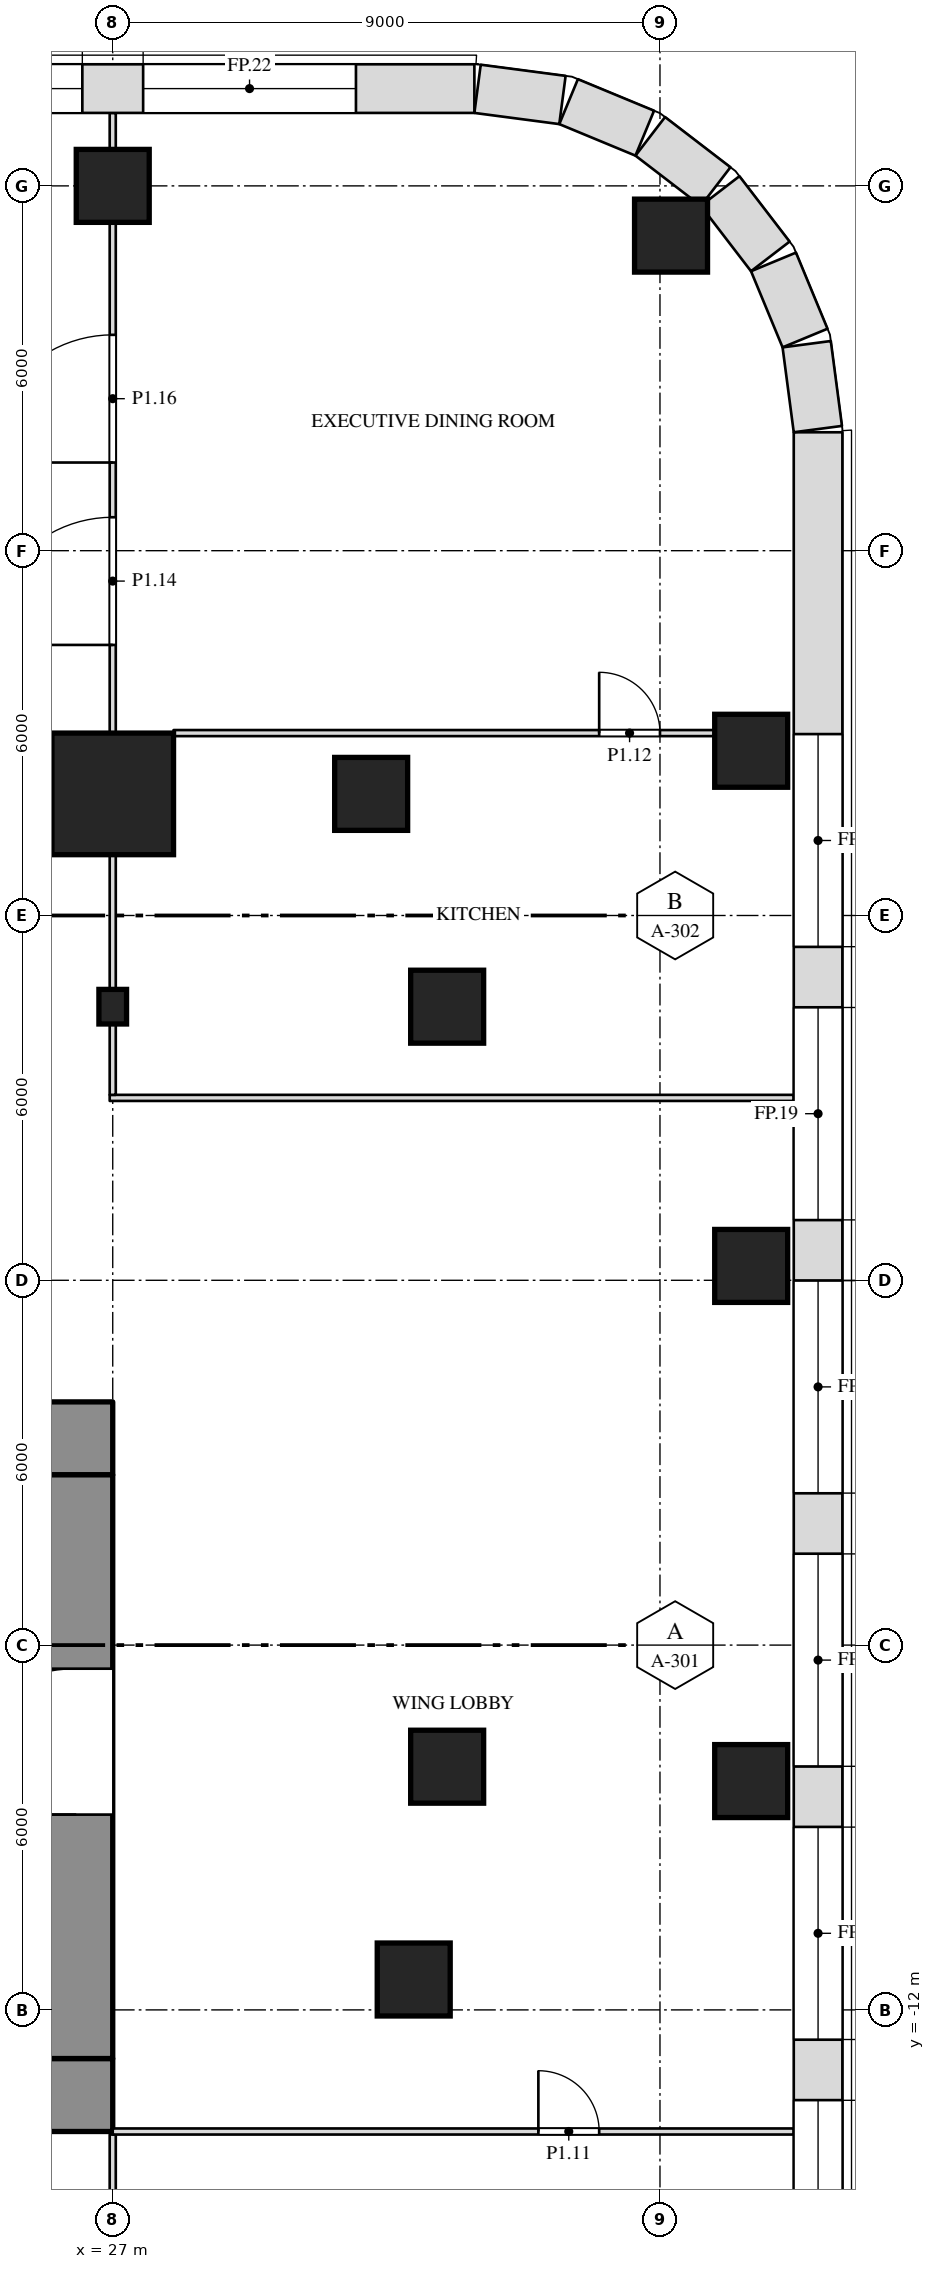
"""IFC4 building model, lengths in metres.
Left out: names, types, materials, properties, quantities, classifications, styles, units other than length and angle.
Written with IfcOpenShell. Run it as: python <this file> out.ifc"""

import sys

from ifc_helpers import new_model, si_unit, direction, frame, frame_2d, origin, origin_2d, place, context, subcontext, project, spatial, rectangle, i_section, extrude, element, fill, save


model = new_model("IFC4")
c1 = context("Model", 3, precision=1e-05, world=origin(), true_north=direction((0.0, 1.0)))
c2 = subcontext(c1, "Body", "Model", "MODEL_VIEW")
j1 = project(units=[si_unit("LENGTHUNIT", "METRE"), si_unit("PLANEANGLEUNIT", "RADIAN")], contexts=[c1])
p1 = place(None, origin())
s1 = spatial("IfcSite", under=j1, at=p1, CompositionType="ELEMENT")
p2 = place(p1, origin())
s2 = spatial("IfcBuilding", under=s1, at=p2, CompositionType="ELEMENT")
p3 = place(p2, frame((0.0, 0.0, 9.0)))
s3 = spatial("IfcBuildingStorey", under=s2, at=p3, CompositionType="ELEMENT", Elevation=9.0)
for number, where, z_axis, x_axis in (
    (1, (31.95, -11.5, 0.0), (0.0, 0.0, 1.0), (1.0, 0.0, 0.0)),
    (2, (37.5, -8.236, 0.0), (0.0, 0.0, 1.0), (1.0, 0.0, 0.0)),
    (3, (32.5, -8.0, 0.0), (0.0, 0.0, 1.0), (1.0, 0.0, 0.0)),
    (4, (37.5, 0.236, 0.0), (0.0, 0.0, 1.0), (1.0, 0.0, 0.0)),
):
    element("IfcColumn", number, at=place(p3, frame(where, z_axis=z_axis, x_axis=x_axis)), inside=s3, PredefinedType="COLUMN", context=c2, shape_type="SweptSolid", body=[
        extrude(rectangle(XDim=1.2, YDim=1.2, at=origin_2d()), origin(), (0.0, 0.0, 1.0), 6.0),
    ])
p4 = place(p3, frame((27.0, 4.5, 0.0), z_axis=(0.0, 0.0, 1.0), x_axis=(1.0, 0.0, 0.0)))
e5 = element("IfcColumn", 5, at=p4, inside=s3, PredefinedType="COLUMN", context=c2, shape_type="SweptSolid", body=[
    extrude(i_section(OverallWidth=0.455, OverallDepth=0.569, WebThickness=0.078, FlangeThickness=0.125, at=origin_2d()), origin(), (0.0, 0.0, 1.0), 6.0),
])
p5 = place(p3, frame((32.5, 4.5, 0.0), z_axis=(0.0, 0.0, 1.0), x_axis=(1.0, 0.0, 0.0)))
e6 = element("IfcColumn", 6, at=p5, inside=s3, PredefinedType="COLUMN", context=c2, shape_type="SweptSolid", body=[
    extrude(rectangle(XDim=1.2, YDim=1.2, at=origin_2d()), origin(), (0.0, 0.0, 1.0), 6.0),
])
p6 = place(p3, frame((27.0, 8.0, 0.0), z_axis=(0.0, 0.0, 1.0), x_axis=(1.0, 0.0, 0.0)))
e7 = element("IfcColumn", 7, at=p6, inside=s3, PredefinedType="COLUMN", context=c2, shape_type="SweptSolid", body=[
    extrude(rectangle(XDim=2.0, YDim=2.0, at=origin_2d()), origin(), (0.0, 0.0, 1.0), 6.0),
])
for number, where, z_axis, x_axis in (
    (8, (31.25, 8.0, 0.0), (0.0, 0.0, 1.0), (1.0, 0.0, 0.0)),
    (9, (37.5, 8.709, 0.0), (0.0, 0.0, 1.0), (1.0, 0.0, 0.0)),
    (10, (36.182, 17.182, 0.0), (0.0, 0.0, 1.0), (1.0, 0.0, 0.0)),
    (11, (27.0, 18.0, 0.0), (0.0, 0.0, 1.0), (1.0, 0.0, 0.0)),
):
    element("IfcColumn", number, at=place(p3, frame(where, z_axis=z_axis, x_axis=x_axis)), inside=s3, PredefinedType="COLUMN", context=c2, shape_type="SweptSolid", body=[
        extrude(rectangle(XDim=1.2, YDim=1.2, at=origin_2d()), origin(), (0.0, 0.0, 1.0), 6.0),
    ])
p7 = place(p3, frame((-27.0, -2.6, 0.0), z_axis=(0.0, 0.0, 1.0), x_axis=(1.0, 0.0, 0.0)))
e12 = element("IfcWall", 12, at=p7, inside=s3, PredefinedType="SHEAR", context=c2, shape_type="SweptSolid", body=[
    extrude(rectangle(XDim=54.0, YDim=1.2, at=frame_2d((27.0, 0.0))), origin(), (0.0, 0.0, 1.0), 5.7),
])
p8 = place(p3, frame((-27.0, -13.4, 0.0), z_axis=(0.0, 0.0, 1.0), x_axis=(1.0, 0.0, 0.0)))
e13 = element("IfcWall", 13, at=p8, inside=s3, PredefinedType="SHEAR", context=c2, shape_type="SweptSolid", body=[
    extrude(rectangle(XDim=54.0, YDim=1.2, at=frame_2d((27.0, 0.0))), origin(), (0.0, 0.0, 1.0), 5.7),
])
p9 = place(p8, frame((16.45, 0.0, 0.0)))
e14 = element("IfcOpeningElement", 14, at=p9, cuts=e13, PredefinedType="OPENING", context=c2, shape_type="SweptSolid", body=[
    extrude(rectangle(XDim=1.0, YDim=2.1, at=frame_2d((0.5, 1.05))), frame((0.0, 0.612, 0.0), z_axis=(0.0, -1.0, 0.0), x_axis=(1.0, 0.0, 0.0)), (0.0, 0.0, 1.0), 1.224),
])
p10 = place(p8, frame((36.55, 0.0, 0.0)))
e15 = element("IfcOpeningElement", 15, at=p10, cuts=e13, PredefinedType="OPENING", context=c2, shape_type="SweptSolid", body=[
    extrude(rectangle(XDim=1.0, YDim=2.1, at=frame_2d((0.5, 1.05))), frame((0.0, 0.612, 0.0), z_axis=(0.0, -1.0, 0.0), x_axis=(1.0, 0.0, 0.0)), (0.0, 0.0, 1.0), 1.224),
])
p11 = place(p3, frame((26.4, -12.8, 0.0), z_axis=(0.0, 0.0, 1.0), x_axis=(0.0, 1.0, 0.0)))
e16 = element("IfcWall", 16, at=p11, inside=s3, PredefinedType="SHEAR", context=c2, shape_type="SweptSolid", body=[
    extrude(rectangle(XDim=9.6, YDim=1.2, at=frame_2d((4.8, 0.0))), origin(), (0.0, 0.0, 1.0), 5.7),
])
p12 = place(p11, frame((4.012, 0.0, 0.0)))
e17 = element("IfcOpeningElement", 17, at=p12, cuts=e16, PredefinedType="OPENING", context=c2, shape_type="SweptSolid", body=[
    extrude(rectangle(XDim=2.4, YDim=2.1, at=frame_2d((1.2, 1.05))), frame((0.0, 0.612, 0.0), z_axis=(0.0, -1.0, 0.0), x_axis=(1.0, 0.0, 0.0)), (0.0, 0.0, 1.0), 1.224),
])
p13 = place(p3, frame((27.0, -16.9, 0.0), z_axis=(0.0, 0.0, 1.0), x_axis=(0.0, 1.0, 0.0)))
e18 = element("IfcWall", 18, at=p13, inside=s3, PredefinedType="PARTITIONING", context=c2, shape_type="SweptSolid", body=[
    extrude(rectangle(XDim=2.85, YDim=0.1, at=frame_2d((1.425, 0.0))), origin(), (0.0, 0.0, 1.0), 5.088),
])
p14 = place(p3, frame((27.0, -14.0, 0.0), z_axis=(0.0, 0.0, 1.0), x_axis=(1.0, 0.0, 0.0)))
e19 = element("IfcWall", 19, at=p14, inside=s3, PredefinedType="PARTITIONING", context=c2, shape_type="SweptSolid", body=[
    extrude(rectangle(XDim=11.2, YDim=0.1, at=frame_2d((5.6, 0.0))), origin(), (0.0, 0.0, 1.0), 5.7),
])
p15 = place(p14, frame((7.0, 0.0, 0.0)))
e20 = element("IfcOpeningElement", 20, at=p15, cuts=e19, PredefinedType="OPENING", context=c2, shape_type="SweptSolid", body=[
    extrude(rectangle(XDim=1.0, YDim=2.1, at=frame_2d((0.5, 1.05))), frame((0.0, 0.062, 0.0), z_axis=(0.0, -1.0, 0.0), x_axis=(1.0, 0.0, 0.0)), (0.0, 0.0, 1.0), 0.124),
])
p16 = place(p3, frame((26.95, 3.0, 0.0), z_axis=(0.0, 0.0, 1.0), x_axis=(1.0, 0.0, 0.0)))
e21 = element("IfcWall", 21, at=p16, inside=s3, PredefinedType="PARTITIONING", context=c2, shape_type="SweptSolid", body=[
    extrude(rectangle(XDim=11.25, YDim=0.1, at=frame_2d((5.625, 0.0))), origin(), (0.0, 0.0, 1.0), 5.7),
])
p17 = place(p3, frame((27.0, 3.05, 0.0), z_axis=(0.0, 0.0, 1.0), x_axis=(0.0, 1.0, 0.0)))
e22 = element("IfcWall", 22, at=p17, inside=s3, PredefinedType="PARTITIONING", context=c2, shape_type="SweptSolid", body=[
    extrude(rectangle(XDim=1.166, YDim=0.1, at=frame_2d((0.583, 0.0))), origin(), (0.0, 0.0, 1.0), 5.088),
])
p18 = place(p3, frame((27.0, 4.784, 0.0), z_axis=(0.0, 0.0, 1.0), x_axis=(0.0, 1.0, 0.0)))
e23 = element("IfcWall", 23, at=p18, inside=s3, PredefinedType="PARTITIONING", context=c2, shape_type="SweptSolid", body=[
    extrude(rectangle(XDim=2.216, YDim=0.1, at=frame_2d((1.108, 0.0))), origin(), (0.0, 0.0, 1.0), 5.088),
])
p19 = place(p3, frame((27.0, 9.0, 0.0), z_axis=(0.0, 0.0, 1.0), x_axis=(0.0, 1.0, 0.0)))
e24 = element("IfcWall", 24, at=p19, inside=s3, PredefinedType="PARTITIONING", context=c2, shape_type="SweptSolid", body=[
    extrude(rectangle(XDim=8.4, YDim=0.1, at=frame_2d((4.2, 0.0))), origin(), (0.0, 0.0, 1.0), 5.088),
])
p20 = place(p19, frame((1.45, 0.0, 0.0)))
e25 = element("IfcOpeningElement", 25, at=p20, cuts=e24, PredefinedType="OPENING", context=c2, shape_type="SweptSolid", body=[
    extrude(rectangle(XDim=2.1, YDim=2.4, at=frame_2d((1.05, 1.2))), frame((0.0, 0.062, 0.0), z_axis=(0.0, -1.0, 0.0), x_axis=(1.0, 0.0, 0.0)), (0.0, 0.0, 1.0), 0.124),
])
p21 = place(p19, frame((4.45, 0.0, 0.0)))
e26 = element("IfcOpeningElement", 26, at=p21, cuts=e24, PredefinedType="OPENING", context=c2, shape_type="SweptSolid", body=[
    extrude(rectangle(XDim=2.1, YDim=2.4, at=frame_2d((1.05, 1.2))), frame((0.0, 0.062, 0.0), z_axis=(0.0, -1.0, 0.0), x_axis=(1.0, 0.0, 0.0)), (0.0, 0.0, 1.0), 0.124),
])
p22 = place(p3, frame((27.0, 18.6, 0.0), z_axis=(0.0, 0.0, 1.0), x_axis=(0.0, 1.0, 0.0)))
e27 = element("IfcWall", 27, at=p22, inside=s3, PredefinedType="PARTITIONING", context=c2, shape_type="SweptSolid", body=[
    extrude(rectangle(XDim=0.6, YDim=0.1, at=frame_2d((0.3, 0.0))), origin(), (0.0, 0.0, 1.0), 5.7),
])
p23 = place(p3, frame((28.0, 9.0, 0.0), z_axis=(0.0, 0.0, 1.0), x_axis=(1.0, 0.0, 0.0)))
e28 = element("IfcWall", 28, at=p23, inside=s3, PredefinedType="PARTITIONING", context=c2, shape_type="SweptSolid", body=[
    extrude(rectangle(XDim=8.9, YDim=0.1, at=frame_2d((4.45, 0.0))), origin(), (0.0, 0.0, 1.0), 5.7),
])
p24 = place(p23, frame((7.0, 0.0, 0.0)))
e29 = element("IfcOpeningElement", 29, at=p24, cuts=e28, PredefinedType="OPENING", context=c2, shape_type="SweptSolid", body=[
    extrude(rectangle(XDim=1.0, YDim=2.1, at=frame_2d((0.5, 1.05))), frame((0.0, 0.062, 0.0), z_axis=(0.0, -1.0, 0.0), x_axis=(1.0, 0.0, 0.0)), (0.0, 0.0, 1.0), 0.124),
])
p25 = place(p3, frame((38.6, -21.948, 0.0), z_axis=(0.0, 0.0, 1.0), x_axis=(0.0, 1.0, 0.0)))
e30 = element("IfcWall", 30, at=p25, inside=s3, PredefinedType="SOLIDWALL", context=c2, shape_type="SweptSolid", body=[
    extrude(rectangle(XDim=35.895, YDim=0.8, at=frame_2d((17.948, 0.0))), origin(), (0.0, 0.0, 1.0), 5.7),
])
p26 = place(p25, frame((4.964, 0.0, 1.0)))
e31 = element("IfcOpeningElement", 31, at=p26, cuts=e30, PredefinedType="OPENING", context=c2, shape_type="SweptSolid", body=[
    extrude(rectangle(XDim=3.5, YDim=4.0, at=frame_2d((1.75, 2.0))), frame((0.0, 0.412, 0.0), z_axis=(0.0, -1.0, 0.0), x_axis=(1.0, 0.0, 0.0)), (0.0, 0.0, 1.0), 0.824),
])
p27 = place(p25, frame((9.458, 0.0, 1.0)))
e32 = element("IfcOpeningElement", 32, at=p27, cuts=e30, PredefinedType="OPENING", context=c2, shape_type="SweptSolid", body=[
    extrude(rectangle(XDim=3.5, YDim=4.0, at=frame_2d((1.75, 2.0))), frame((0.0, 0.412, 0.0), z_axis=(0.0, -1.0, 0.0), x_axis=(1.0, 0.0, 0.0)), (0.0, 0.0, 1.0), 0.824),
])
p28 = place(p25, frame((13.951, 0.0, 1.0)))
e33 = element("IfcOpeningElement", 33, at=p28, cuts=e30, PredefinedType="OPENING", context=c2, shape_type="SweptSolid", body=[
    extrude(rectangle(XDim=3.5, YDim=4.0, at=frame_2d((1.75, 2.0))), frame((0.0, 0.412, 0.0), z_axis=(0.0, -1.0, 0.0), x_axis=(1.0, 0.0, 0.0)), (0.0, 0.0, 1.0), 0.824),
])
p29 = place(p25, frame((18.444, 0.0, 1.0)))
e34 = element("IfcOpeningElement", 34, at=p29, cuts=e30, PredefinedType="OPENING", context=c2, shape_type="SweptSolid", body=[
    extrude(rectangle(XDim=3.5, YDim=4.0, at=frame_2d((1.75, 2.0))), frame((0.0, 0.412, 0.0), z_axis=(0.0, -1.0, 0.0), x_axis=(1.0, 0.0, 0.0)), (0.0, 0.0, 1.0), 0.824),
])
p30 = place(p25, frame((22.938, 0.0, 1.0)))
e35 = element("IfcOpeningElement", 35, at=p30, cuts=e30, PredefinedType="OPENING", context=c2, shape_type="SweptSolid", body=[
    extrude(rectangle(XDim=3.5, YDim=4.0, at=frame_2d((1.75, 2.0))), frame((0.0, 0.412, 0.0), z_axis=(0.0, -1.0, 0.0), x_axis=(1.0, 0.0, 0.0)), (0.0, 0.0, 1.0), 0.824),
])
p31 = place(p25, frame((27.431, 0.0, 1.0)))
e36 = element("IfcOpeningElement", 36, at=p31, cuts=e30, PredefinedType="OPENING", context=c2, shape_type="SweptSolid", body=[
    extrude(rectangle(XDim=3.5, YDim=4.0, at=frame_2d((1.75, 2.0))), frame((0.0, 0.412, 0.0), z_axis=(0.0, -1.0, 0.0), x_axis=(1.0, 0.0, 0.0)), (0.0, 0.0, 1.0), 0.824),
])
p32 = place(p3, frame((38.597, 14.0, 0.0), z_axis=(0.0, 0.0, 1.0), x_axis=(-0.130517283865, 0.99144603414, 0.0)))
e37 = element("IfcWall", 37, at=p32, inside=s3, PredefinedType="SOLIDWALL", context=c2, shape_type="SweptSolid", body=[
    extrude(rectangle(XDim=1.408, YDim=0.8, at=frame_2d((0.704, 0.0))), origin(), (0.0, 0.0, 1.0), 5.7),
])
p33 = place(p3, frame((38.386, 15.497, 0.0), z_axis=(0.0, 0.0, 1.0), x_axis=(-0.38276009378, 0.923847774587, 0.0)))
e38 = element("IfcWall", 38, at=p33, inside=s3, PredefinedType="SOLIDWALL", context=c2, shape_type="SweptSolid", body=[
    extrude(rectangle(XDim=1.355, YDim=0.8, at=frame_2d((0.678, 0.0))), origin(), (0.0, 0.0, 1.0), 5.7),
])
for number, where, z_axis, x_axis in (
    (39, (37.815, 16.84, 0.0), (0.0, 0.0, 1.0), (-0.609, 0.793, 0.0)),
    (40, (36.916, 17.989, 0.0), (0.0, 0.0, 1.0), (-0.793, 0.609, 0.0)),
):
    element("IfcWall", number, at=place(p3, frame(where, z_axis=z_axis, x_axis=x_axis)), inside=s3, PredefinedType="SOLIDWALL", context=c2, shape_type="SweptSolid", body=[
        extrude(rectangle(XDim=1.356, YDim=0.8, at=frame_2d((0.678, 0.0))), origin(), (0.0, 0.0, 1.0), 5.7),
    ])
p34 = place(p3, frame((35.75, 18.867, 0.0), z_axis=(0.0, 0.0, 1.0), x_axis=(-0.923847774587, 0.38276009378, 0.0)))
e41 = element("IfcWall", 41, at=p34, inside=s3, PredefinedType="SOLIDWALL", context=c2, shape_type="SweptSolid", body=[
    extrude(rectangle(XDim=1.355, YDim=0.8, at=frame_2d((0.678, 0.0))), origin(), (0.0, 0.0, 1.0), 5.7),
])
p35 = place(p3, frame((34.396, 19.413, 0.0), z_axis=(0.0, 0.0, 1.0), x_axis=(-0.99144603414, 0.130517283865, 0.0)))
e42 = element("IfcWall", 42, at=p35, inside=s3, PredefinedType="SOLIDWALL", context=c2, shape_type="SweptSolid", body=[
    extrude(rectangle(XDim=1.408, YDim=0.8, at=frame_2d((0.704, 0.0))), origin(), (0.0, 0.0, 1.0), 5.7),
])
p36 = place(p3, frame((32.948, 19.6, 0.0), z_axis=(0.0, 0.0, 1.0), x_axis=(-1.0, 0.0, 0.0)))
e43 = element("IfcWall", 43, at=p36, inside=s3, PredefinedType="SOLIDWALL", context=c2, shape_type="SweptSolid", body=[
    extrude(rectangle(XDim=14.948, YDim=0.8, at=frame_2d((7.474, 0.0))), origin(), (0.0, 0.0, 1.0), 5.7),
])
p37 = place(p36, frame((1.948, 0.0, 1.0)))
e44 = element("IfcOpeningElement", 44, at=p37, cuts=e43, PredefinedType="OPENING", context=c2, shape_type="SweptSolid", body=[
    extrude(rectangle(XDim=3.5, YDim=4.0, at=frame_2d((1.75, 2.0))), frame((0.0, 0.412, 0.0), z_axis=(0.0, -1.0, 0.0), x_axis=(1.0, 0.0, 0.0)), (0.0, 0.0, 1.0), 0.824),
])
p38 = place(p36, frame((6.448, 0.0, 1.0)))
e45 = element("IfcOpeningElement", 45, at=p38, cuts=e43, PredefinedType="OPENING", context=c2, shape_type="SweptSolid", body=[
    extrude(rectangle(XDim=3.5, YDim=4.0, at=frame_2d((1.75, 2.0))), frame((0.0, 0.412, 0.0), z_axis=(0.0, -1.0, 0.0), x_axis=(1.0, 0.0, 0.0)), (0.0, 0.0, 1.0), 0.824),
])
p39 = place(p36, frame((10.948, 0.0, 1.0)))
e46 = element("IfcOpeningElement", 46, at=p39, cuts=e43, PredefinedType="OPENING", context=c2, shape_type="SweptSolid", body=[
    extrude(rectangle(XDim=3.5, YDim=4.0, at=frame_2d((1.75, 2.0))), frame((0.0, 0.412, 0.0), z_axis=(0.0, -1.0, 0.0), x_axis=(1.0, 0.0, 0.0)), (0.0, 0.0, 1.0), 0.824),
])
p40 = place(p15, origin())
e47 = element("IfcDoor", 47, at=p40, inside=s3, OperationType="SINGLE_SWING_LEFT", PredefinedType="DOOR", context=c2, shape_type="SweptSolid", body=[
    extrude(rectangle(XDim=1.0, YDim=2.1, at=frame_2d((0.5, 1.05))), frame((0.0, 0.025, 0.0), z_axis=(0.0, -1.0, 0.0), x_axis=(1.0, 0.0, 0.0)), (0.0, 0.0, 1.0), 0.05),
])
fill(e20, e47)
p41 = place(p24, origin())
e48 = element("IfcDoor", 48, at=p41, inside=s3, OperationType="SINGLE_SWING_LEFT", PredefinedType="DOOR", context=c2, shape_type="SweptSolid", body=[
    extrude(rectangle(XDim=1.0, YDim=2.1, at=frame_2d((0.5, 1.05))), frame((0.0, 0.025, 0.0), z_axis=(0.0, -1.0, 0.0), x_axis=(1.0, 0.0, 0.0)), (0.0, 0.0, 1.0), 0.05),
])
fill(e29, e48)
p42 = place(p20, origin())
e49 = element("IfcDoor", 49, at=p42, inside=s3, OperationType="DOUBLE_DOOR_SINGLE_SWING", PredefinedType="DOOR", context=c2, shape_type="SweptSolid", body=[
    extrude(rectangle(XDim=2.1, YDim=2.4, at=frame_2d((1.05, 1.2))), frame((0.0, 0.025, 0.0), z_axis=(0.0, -1.0, 0.0), x_axis=(1.0, 0.0, 0.0)), (0.0, 0.0, 1.0), 0.05),
])
fill(e25, e49)
p43 = place(p21, origin())
e50 = element("IfcDoor", 50, at=p43, inside=s3, OperationType="DOUBLE_DOOR_SINGLE_SWING", PredefinedType="DOOR", context=c2, shape_type="SweptSolid", body=[
    extrude(rectangle(XDim=2.1, YDim=2.4, at=frame_2d((1.05, 1.2))), frame((0.0, 0.025, 0.0), z_axis=(0.0, -1.0, 0.0), x_axis=(1.0, 0.0, 0.0)), (0.0, 0.0, 1.0), 0.05),
])
fill(e26, e50)
p44 = place(p26, origin())
e51 = element("IfcWindow", 51, at=p44, inside=s3, PartitioningType="SINGLE_PANEL", PredefinedType="WINDOW", context=c2, shape_type="SweptSolid", body=[
    extrude(rectangle(XDim=3.5, YDim=4.0, at=frame_2d((1.75, 2.0))), frame((0.0, 0.03, 0.0), z_axis=(0.0, -1.0, 0.0), x_axis=(1.0, 0.0, 0.0)), (0.0, 0.0, 1.0), 0.06),
])
fill(e31, e51)
p45 = place(p27, origin())
e52 = element("IfcWindow", 52, at=p45, inside=s3, PartitioningType="SINGLE_PANEL", PredefinedType="WINDOW", context=c2, shape_type="SweptSolid", body=[
    extrude(rectangle(XDim=3.5, YDim=4.0, at=frame_2d((1.75, 2.0))), frame((0.0, 0.03, 0.0), z_axis=(0.0, -1.0, 0.0), x_axis=(1.0, 0.0, 0.0)), (0.0, 0.0, 1.0), 0.06),
])
fill(e32, e52)
p46 = place(p28, origin())
e53 = element("IfcWindow", 53, at=p46, inside=s3, PartitioningType="SINGLE_PANEL", PredefinedType="WINDOW", context=c2, shape_type="SweptSolid", body=[
    extrude(rectangle(XDim=3.5, YDim=4.0, at=frame_2d((1.75, 2.0))), frame((0.0, 0.03, 0.0), z_axis=(0.0, -1.0, 0.0), x_axis=(1.0, 0.0, 0.0)), (0.0, 0.0, 1.0), 0.06),
])
fill(e33, e53)
p47 = place(p29, origin())
e54 = element("IfcWindow", 54, at=p47, inside=s3, PartitioningType="SINGLE_PANEL", PredefinedType="WINDOW", context=c2, shape_type="SweptSolid", body=[
    extrude(rectangle(XDim=3.5, YDim=4.0, at=frame_2d((1.75, 2.0))), frame((0.0, 0.03, 0.0), z_axis=(0.0, -1.0, 0.0), x_axis=(1.0, 0.0, 0.0)), (0.0, 0.0, 1.0), 0.06),
])
fill(e34, e54)
p48 = place(p30, origin())
e55 = element("IfcWindow", 55, at=p48, inside=s3, PartitioningType="SINGLE_PANEL", PredefinedType="WINDOW", context=c2, shape_type="SweptSolid", body=[
    extrude(rectangle(XDim=3.5, YDim=4.0, at=frame_2d((1.75, 2.0))), frame((0.0, 0.03, 0.0), z_axis=(0.0, -1.0, 0.0), x_axis=(1.0, 0.0, 0.0)), (0.0, 0.0, 1.0), 0.06),
])
fill(e35, e55)
p49 = place(p31, origin())
e56 = element("IfcWindow", 56, at=p49, inside=s3, PartitioningType="SINGLE_PANEL", PredefinedType="WINDOW", context=c2, shape_type="SweptSolid", body=[
    extrude(rectangle(XDim=3.5, YDim=4.0, at=frame_2d((1.75, 2.0))), frame((0.0, 0.03, 0.0), z_axis=(0.0, -1.0, 0.0), x_axis=(1.0, 0.0, 0.0)), (0.0, 0.0, 1.0), 0.06),
])
fill(e36, e56)
p50 = place(p37, origin())
e57 = element("IfcWindow", 57, at=p50, inside=s3, PartitioningType="SINGLE_PANEL", PredefinedType="WINDOW", context=c2, shape_type="SweptSolid", body=[
    extrude(rectangle(XDim=3.5, YDim=4.0, at=frame_2d((1.75, 2.0))), frame((0.0, 0.03, 0.0), z_axis=(0.0, -1.0, 0.0), x_axis=(1.0, 0.0, 0.0)), (0.0, 0.0, 1.0), 0.06),
])
fill(e44, e57)
p51 = place(p38, origin())
e58 = element("IfcWindow", 58, at=p51, inside=s3, PartitioningType="SINGLE_PANEL", PredefinedType="WINDOW", context=c2, shape_type="SweptSolid", body=[
    extrude(rectangle(XDim=3.5, YDim=4.0, at=frame_2d((1.75, 2.0))), frame((0.0, 0.03, 0.0), z_axis=(0.0, -1.0, 0.0), x_axis=(1.0, 0.0, 0.0)), (0.0, 0.0, 1.0), 0.06),
])
fill(e45, e58)
p52 = place(p12, origin())
e59 = element("IfcDoor", 59, at=p52, inside=s3, OperationType="DOUBLE_DOOR_SINGLE_SWING", PredefinedType="DOOR", context=c2, shape_type="SweptSolid", body=[
    extrude(rectangle(XDim=2.4, YDim=2.1, at=frame_2d((1.2, 1.05))), frame((0.0, 0.025, 0.0), z_axis=(0.0, -1.0, 0.0), x_axis=(1.0, 0.0, 0.0)), (0.0, 0.0, 1.0), 0.05),
])
fill(e17, e59)
save(model, sys.argv[1])
